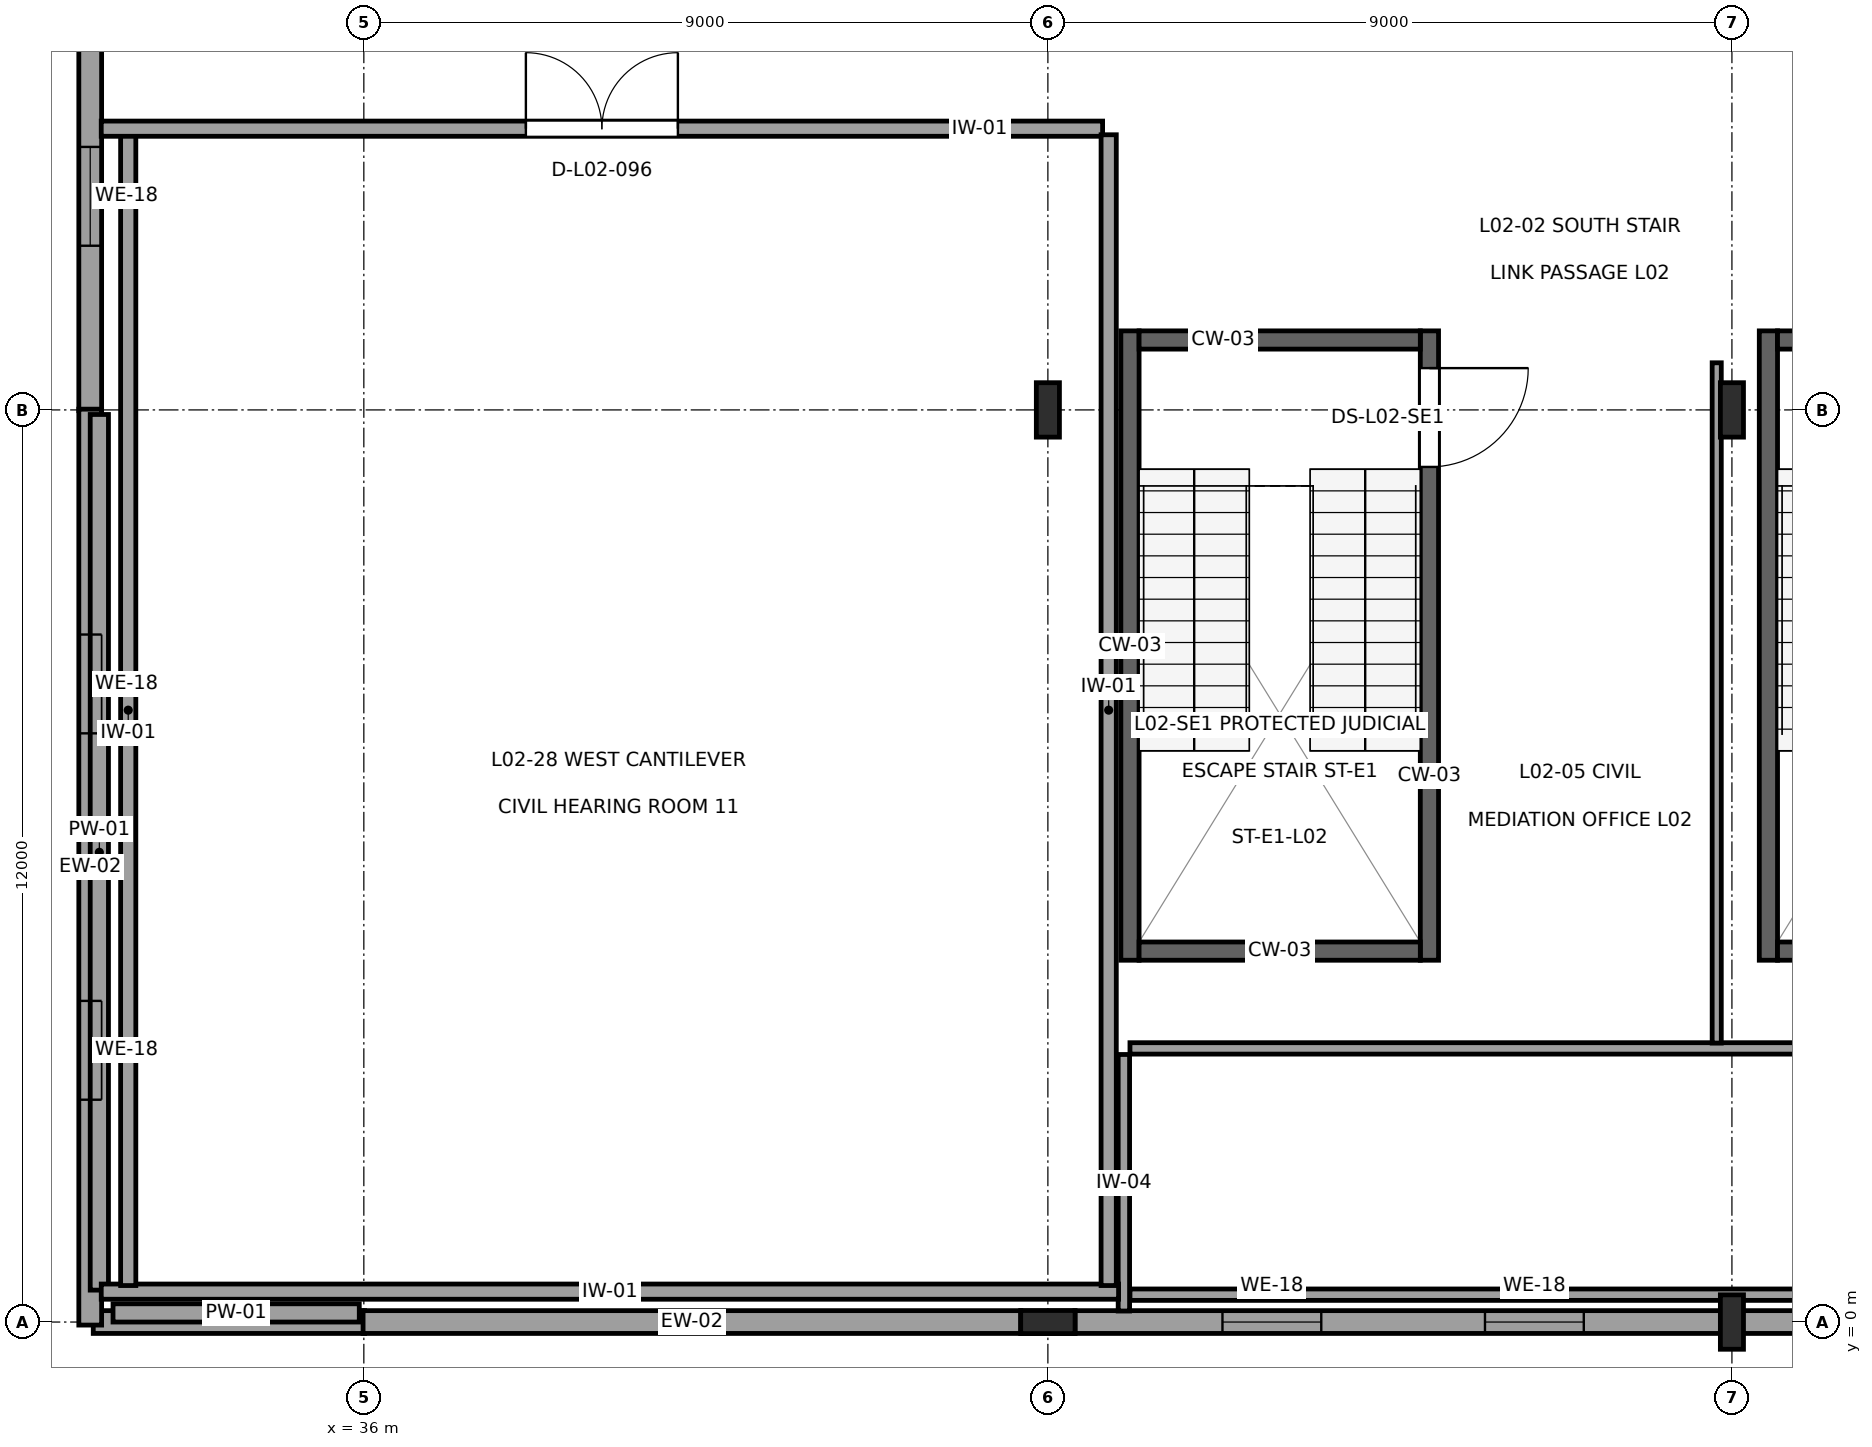
"""IFC4 building model, lengths in metres.
Left out: names, types, materials, properties, quantities, classifications, styles, units other than length and angle.
Written with IfcOpenShell. Run it as: python <this file> out.ifc"""

import sys

from ifc_helpers import new_model, si_unit, direction, frame, frame_2d, origin, origin_2d, place, context, subcontext, project, spatial, rectangle, i_section, extrude, element, fill, save


model = new_model("IFC4")
c1 = context("Model", 3, precision=1e-05, world=origin(), true_north=direction((0.0, 1.0)))
c2 = subcontext(c1, "Body", "Model", "MODEL_VIEW")
j1 = project(units=[si_unit("LENGTHUNIT", "METRE"), si_unit("PLANEANGLEUNIT", "RADIAN")], contexts=[c1])
p1 = place(None, origin())
s1 = spatial("IfcSite", under=j1, at=p1, CompositionType="ELEMENT")
p2 = place(p1, origin())
s2 = spatial("IfcBuilding", under=s1, at=p2, CompositionType="ELEMENT")
p3 = place(p2, frame((0.0, 0.0, 9.9)))
s3 = spatial("IfcBuildingStorey", under=s2, at=p3, CompositionType="ELEMENT", Elevation=9.9)
for number, where, z_axis, x_axis in (
    (1, (45.0, 0.0, 0.0), (0.0, 0.0, 1.0), (0.0, 1.0, 0.0)),
    (2, (45.0, 12.0, 0.0), (0.0, 0.0, 1.0), (1.0, 0.0, 0.0)),
    (3, (54.0, 0.0, 0.0), (0.0, 0.0, 1.0), (1.0, 0.0, 0.0)),
    (4, (54.0, 12.0, 0.0), (0.0, 0.0, 1.0), (1.0, 0.0, 0.0)),
):
    element("IfcColumn", number, at=place(p3, frame(where, z_axis=z_axis, x_axis=x_axis)), inside=s3, PredefinedType="COLUMN", context=c2, shape_type="SweptSolid", body=[
        extrude(i_section(OverallWidth=0.304, OverallDepth=0.716, WebThickness=0.021, FlangeThickness=0.04, at=origin_2d()), origin(), (0.0, 0.0, 1.0), 4.5),
    ])
p4 = place(p3, frame((32.44, 0.0, 0.0), z_axis=(0.0, 0.0, 1.0), x_axis=(1.0, 0.0, 0.0)))
e5 = element("IfcWall", 5, at=p4, inside=s3, PredefinedType="SOLIDWALL", context=c2, shape_type="SweptSolid", body=[
    extrude(rectangle(XDim=3.57, YDim=0.3, at=frame_2d((1.785, 0.0))), origin(), (0.0, 0.0, 1.0), 3.147),
])
p5 = place(p3, frame((35.99, 0.0, 0.0), z_axis=(0.0, 0.0, 1.0), x_axis=(1.0, 0.0, 0.0)))
e6 = element("IfcWall", 6, at=p5, inside=s3, PredefinedType="SOLIDWALL", context=c2, shape_type="SweptSolid", body=[
    extrude(rectangle(XDim=8.654, YDim=0.3, at=frame_2d((4.327, 0.0))), origin(), (0.0, 0.0, 1.0), 3.147),
])
p6 = place(p3, frame((45.356, 0.0, 0.0), z_axis=(0.0, 0.0, 1.0), x_axis=(1.0, 0.0, 0.0)))
e7 = element("IfcWall", 7, at=p6, inside=s3, PredefinedType="SOLIDWALL", context=c2, shape_type="SweptSolid", body=[
    extrude(rectangle(XDim=8.636, YDim=0.3, at=frame_2d((4.318, 0.0))), origin(), (0.0, 0.0, 1.0), 3.147),
])
p7 = place(p6, frame((1.941, 0.0, 0.9)))
e8 = element("IfcOpeningElement", 8, at=p7, cuts=e7, PredefinedType="OPENING", context=c2, shape_type="SweptSolid", body=[
    extrude(rectangle(XDim=1.3, YDim=1.3, at=frame_2d((0.65, 0.65))), frame((0.0, 0.165, 0.0), z_axis=(0.0, -1.0, 0.0), x_axis=(1.0, 0.0, 0.0)), (0.0, 0.0, 1.0), 0.33),
])
p8 = place(p6, frame((5.395, 0.0, 0.9)))
e9 = element("IfcOpeningElement", 9, at=p8, cuts=e7, PredefinedType="OPENING", context=c2, shape_type="SweptSolid", body=[
    extrude(rectangle(XDim=1.3, YDim=1.3, at=frame_2d((0.65, 0.65))), frame((0.0, 0.165, 0.0), z_axis=(0.0, -1.0, 0.0), x_axis=(1.0, 0.0, 0.0)), (0.0, 0.0, 1.0), 0.33),
])
p9 = place(p3, frame((54.008, 0.0, 0.0), z_axis=(0.0, 0.0, 1.0), x_axis=(1.0, 0.0, 0.0)))
e10 = element("IfcWall", 10, at=p9, inside=s3, PredefinedType="SOLIDWALL", context=c2, shape_type="SweptSolid", body=[
    extrude(rectangle(XDim=8.984, YDim=0.3, at=frame_2d((4.492, 0.0))), origin(), (0.0, 0.0, 1.0), 3.147),
])
p10 = place(p9, frame((2.045, 0.0, 0.9)))
e11 = element("IfcOpeningElement", 11, at=p10, cuts=e10, PredefinedType="OPENING", context=c2, shape_type="SweptSolid", body=[
    extrude(rectangle(XDim=1.3, YDim=1.3, at=frame_2d((0.65, 0.65))), frame((0.0, 0.165, 0.0), z_axis=(0.0, -1.0, 0.0), x_axis=(1.0, 0.0, 0.0)), (0.0, 0.0, 1.0), 0.33),
])
p11 = place(p9, frame((5.639, 0.0, 0.9)))
e12 = element("IfcOpeningElement", 12, at=p11, cuts=e10, PredefinedType="OPENING", context=c2, shape_type="SweptSolid", body=[
    extrude(rectangle(XDim=1.3, YDim=1.3, at=frame_2d((0.65, 0.65))), frame((0.0, 0.165, 0.0), z_axis=(0.0, -1.0, 0.0), x_axis=(1.0, 0.0, 0.0)), (0.0, 0.0, 1.0), 0.33),
])
p12 = place(p3, frame((32.4, 23.96, 0.0), z_axis=(0.0, 0.0, 1.0), x_axis=(0.0, -1.0, 0.0)))
e13 = element("IfcWall", 13, at=p12, inside=s3, PredefinedType="SOLIDWALL", context=c2, shape_type="SweptSolid", body=[
    extrude(rectangle(XDim=11.97, YDim=0.3, at=frame_2d((5.985, 0.0))), origin(), (0.0, 0.0, 1.0), 3.455),
])
p13 = place(p12, frame((2.941, 0.0, 0.9)))
e14 = element("IfcOpeningElement", 14, at=p13, cuts=e13, PredefinedType="OPENING", context=c2, shape_type="SweptSolid", body=[
    extrude(rectangle(XDim=1.3, YDim=1.3, at=frame_2d((0.65, 0.65))), frame((0.0, 0.165, 0.0), z_axis=(0.0, -1.0, 0.0), x_axis=(1.0, 0.0, 0.0)), (0.0, 0.0, 1.0), 0.33),
])
p14 = place(p12, frame((8.5, 0.0, 0.9)))
e15 = element("IfcOpeningElement", 15, at=p14, cuts=e13, PredefinedType="OPENING", context=c2, shape_type="SweptSolid", body=[
    extrude(rectangle(XDim=1.3, YDim=1.3, at=frame_2d((0.65, 0.65))), frame((0.0, 0.165, 0.0), z_axis=(0.0, -1.0, 0.0), x_axis=(1.0, 0.0, 0.0)), (0.0, 0.0, 1.0), 0.33),
])
p15 = place(p3, frame((32.4, 12.01, 0.0), z_axis=(0.0, 0.0, 1.0), x_axis=(0.0, -1.0, 0.0)))
e16 = element("IfcWall", 16, at=p15, inside=s3, PredefinedType="SOLIDWALL", context=c2, shape_type="SweptSolid", body=[
    extrude(rectangle(XDim=12.05, YDim=0.3, at=frame_2d((6.025, 0.0))), origin(), (0.0, 0.0, 1.0), 3.455),
])
p16 = place(p15, frame((2.965, 0.0, 0.9)))
e17 = element("IfcOpeningElement", 17, at=p16, cuts=e16, PredefinedType="OPENING", context=c2, shape_type="SweptSolid", body=[
    extrude(rectangle(XDim=1.3, YDim=1.3, at=frame_2d((0.65, 0.65))), frame((0.0, 0.165, 0.0), z_axis=(0.0, -1.0, 0.0), x_axis=(1.0, 0.0, 0.0)), (0.0, 0.0, 1.0), 0.33),
])
p17 = place(p15, frame((7.785, 0.0, 0.9)))
e18 = element("IfcOpeningElement", 18, at=p17, cuts=e16, PredefinedType="OPENING", context=c2, shape_type="SweptSolid", body=[
    extrude(rectangle(XDim=1.3, YDim=1.3, at=frame_2d((0.65, 0.65))), frame((0.0, 0.165, 0.0), z_axis=(0.0, -1.0, 0.0), x_axis=(1.0, 0.0, 0.0)), (0.0, 0.0, 1.0), 0.33),
])
p18 = place(p3, frame((32.7, 0.12, 4.28), z_axis=(0.0, 0.0, 1.0), x_axis=(1.0, 0.0, 0.0)))
e19 = element("IfcWall", 19, at=p18, inside=s3, PredefinedType="PARAPET", context=c2, shape_type="SweptSolid", body=[
    extrude(rectangle(XDim=3.24, YDim=0.24, at=frame_2d((1.62, 0.0))), origin(), (0.0, 0.0, 1.0), 0.77),
])
p19 = place(p3, frame((32.52, 0.42, 4.28), z_axis=(0.0, 0.0, 1.0), x_axis=(0.0, 1.0, 0.0)))
e20 = element("IfcWall", 20, at=p19, inside=s3, PredefinedType="PARAPET", context=c2, shape_type="SweptSolid", body=[
    extrude(rectangle(XDim=11.52, YDim=0.24, at=frame_2d((5.76, 0.0))), origin(), (0.0, 0.0, 1.0), 0.77),
])
p20 = place(p3, frame((54.48, 4.76, 0.0), z_axis=(0.0, 0.0, 1.0), x_axis=(0.0, 1.0, 0.0)))
e21 = element("IfcWall", 21, at=p20, inside=s3, PredefinedType="SHEAR", context=c2, shape_type="SweptSolid", body=[
    extrude(rectangle(XDim=8.28, YDim=0.24, at=frame_2d((4.14, 0.0))), origin(), (0.0, 0.0, 1.0), 4.31),
])
for number, where, z_axis, x_axis in (
    (22, (54.6, 4.88, 0.0), (0.0, 0.0, 1.0), (1.0, 0.0, 0.0)),
    (23, (54.6, 12.92, 0.0), (0.0, 0.0, 1.0), (1.0, 0.0, 0.0)),
):
    element("IfcWall", number, at=place(p3, frame(where, z_axis=z_axis, x_axis=x_axis)), inside=s3, PredefinedType="SHEAR", context=c2, shape_type="SweptSolid", body=[
        extrude(rectangle(XDim=3.7, YDim=0.24, at=frame_2d((1.85, 0.0))), origin(), (0.0, 0.0, 1.0), 4.31),
    ])
p21 = place(p3, frame((46.08, 4.76, 0.0), z_axis=(0.0, 0.0, 1.0), x_axis=(0.0, 1.0, 0.0)))
e24 = element("IfcWall", 24, at=p21, inside=s3, PredefinedType="SHEAR", context=c2, shape_type="SweptSolid", body=[
    extrude(rectangle(XDim=8.28, YDim=0.24, at=frame_2d((4.14, 0.0))), origin(), (0.0, 0.0, 1.0), 4.31),
])
p22 = place(p3, frame((50.02, 4.76, 0.0), z_axis=(0.0, 0.0, 1.0), x_axis=(0.0, 1.0, 0.0)))
e25 = element("IfcWall", 25, at=p22, inside=s3, PredefinedType="SHEAR", context=c2, shape_type="SweptSolid", body=[
    extrude(rectangle(XDim=8.28, YDim=0.24, at=frame_2d((4.14, 0.0))), origin(), (0.0, 0.0, 1.0), 4.31),
])
p23 = place(p22, frame((6.49, 0.0, 0.0)))
e26 = element("IfcOpeningElement", 26, at=p23, cuts=e25, PredefinedType="OPENING", context=c2, shape_type="SweptSolid", body=[
    extrude(rectangle(XDim=1.3, YDim=2.2, at=frame_2d((0.65, 1.1))), frame((0.0, 0.135, 0.0), z_axis=(0.0, -1.0, 0.0), x_axis=(1.0, 0.0, 0.0)), (0.0, 0.0, 1.0), 0.27),
])
for number, where, z_axis, x_axis in (
    (27, (46.2, 4.88, 0.0), (0.0, 0.0, 1.0), (1.0, 0.0, 0.0)),
    (28, (46.2, 12.92, 0.0), (0.0, 0.0, 1.0), (1.0, 0.0, 0.0)),
):
    element("IfcWall", number, at=place(p3, frame(where, z_axis=z_axis, x_axis=x_axis)), inside=s3, PredefinedType="SHEAR", context=c2, shape_type="SweptSolid", body=[
        extrude(rectangle(XDim=3.7, YDim=0.24, at=frame_2d((1.85, 0.0))), origin(), (0.0, 0.0, 1.0), 4.31),
    ])
p24 = place(p3, frame((71.92, 0.36, 0.0), z_axis=(0.0, 0.0, 1.0), x_axis=(-1.0, 0.0, 0.0)))
e29 = element("IfcWall", 29, at=p24, inside=s3, PredefinedType="PARTITIONING", context=c2, shape_type="SweptSolid", body=[
    extrude(rectangle(XDim=25.84, YDim=0.15, at=frame_2d((12.92, 0.0))), origin(), (0.0, 0.0, 1.0), 4.14),
])
p25 = place(p3, frame((46.0, 0.145, 0.0), z_axis=(0.0, 0.0, 1.0), x_axis=(0.0, 1.0, 0.0)))
e30 = element("IfcWall", 30, at=p25, inside=s3, PredefinedType="PARTITIONING", context=c2, shape_type="SweptSolid", body=[
    extrude(rectangle(XDim=3.375, YDim=0.15, at=frame_2d((1.688, 0.0))), origin(), (0.0, 0.0, 1.0), 4.14),
])
p26 = place(p3, frame((46.08, 3.6, 0.0), z_axis=(0.0, 0.0, 1.0), x_axis=(1.0, 0.0, 0.0)))
e31 = element("IfcWall", 31, at=p26, inside=s3, PredefinedType="PARTITIONING", context=c2, shape_type="SweptSolid", body=[
    extrude(rectangle(XDim=71.04, YDim=0.15, at=frame_2d((35.52, 0.0))), origin(), (0.0, 0.0, 1.0), 4.14),
])
p27 = place(p26, frame((27.595, 0.0, 0.0)))
e32 = element("IfcOpeningElement", 32, at=p27, cuts=e31, PredefinedType="OPENING", context=c2, shape_type="SweptSolid", body=[
    extrude(rectangle(XDim=1.05, YDim=2.25, at=frame_2d((0.525, 1.125))), frame((0.0, 0.09, 0.0), z_axis=(0.0, -1.0, 0.0), x_axis=(1.0, 0.0, 0.0)), (0.0, 0.0, 1.0), 0.18),
])
p28 = place(p3, frame((53.8, 12.62, 0.0), z_axis=(0.0, 0.0, 1.0), x_axis=(0.0, -1.0, 0.0)))
e33 = element("IfcWall", 33, at=p28, inside=s3, PredefinedType="PARTITIONING", context=c2, shape_type="SweptSolid", body=[
    extrude(rectangle(XDim=8.95, YDim=0.12, at=frame_2d((4.475, 0.0))), origin(), (0.0, 0.0, 1.0), 3.685),
])
p29 = place(p3, frame((45.93, 0.4, 0.0), z_axis=(0.0, 0.0, 1.0), x_axis=(-1.0, 0.0, 0.0)))
e34 = element("IfcWall", 34, at=p29, inside=s3, PredefinedType="PARTITIONING", context=c2, shape_type="SweptSolid", body=[
    extrude(rectangle(XDim=13.385, YDim=0.2, at=frame_2d((6.692, 0.0))), origin(), (0.0, 0.0, 1.0), 4.14),
])
p30 = place(p3, frame((32.9, 0.48, 0.0), z_axis=(0.0, 0.0, 1.0), x_axis=(0.0, 1.0, 0.0)))
e35 = element("IfcWall", 35, at=p30, inside=s3, PredefinedType="PARTITIONING", context=c2, shape_type="SweptSolid", body=[
    extrude(rectangle(XDim=15.14, YDim=0.2, at=frame_2d((7.57, 0.0))), origin(), (0.0, 0.0, 1.0), 4.14),
])
p31 = place(p3, frame((32.545, 15.7, 0.0), z_axis=(0.0, 0.0, 1.0), x_axis=(1.0, 0.0, 0.0)))
e36 = element("IfcWall", 36, at=p31, inside=s3, PredefinedType="PARTITIONING", context=c2, shape_type="SweptSolid", body=[
    extrude(rectangle(XDim=13.175, YDim=0.2, at=frame_2d((6.587, 0.0))), origin(), (0.0, 0.0, 1.0), 4.14),
])
p32 = place(p31, frame((5.587, 0.0, 0.0)))
e37 = element("IfcOpeningElement", 37, at=p32, cuts=e36, PredefinedType="OPENING", context=c2, shape_type="SweptSolid", body=[
    extrude(rectangle(XDim=2.0, YDim=2.6, at=frame_2d((1.0, 1.3))), frame((0.0, 0.115, 0.0), z_axis=(0.0, -1.0, 0.0), x_axis=(1.0, 0.0, 0.0)), (0.0, 0.0, 1.0), 0.23),
])
p33 = place(p3, frame((45.8, 15.62, 0.0), z_axis=(0.0, 0.0, 1.0), x_axis=(0.0, -1.0, 0.0)))
e38 = element("IfcWall", 38, at=p33, inside=s3, PredefinedType="PARTITIONING", context=c2, shape_type="SweptSolid", body=[
    extrude(rectangle(XDim=15.14, YDim=0.2, at=frame_2d((7.57, 0.0))), origin(), (0.0, 0.0, 1.0), 4.14),
])
p34 = place(p7, origin())
e39 = element("IfcWindow", 39, at=p34, inside=s3, PartitioningType="SINGLE_PANEL", PredefinedType="WINDOW", context=c2, shape_type="SweptSolid", body=[
    extrude(rectangle(XDim=1.3, YDim=1.3, at=frame_2d((0.65, 0.65))), frame((0.0, 0.03, 0.0), z_axis=(0.0, -1.0, 0.0), x_axis=(1.0, 0.0, 0.0)), (0.0, 0.0, 1.0), 0.06),
])
fill(e8, e39)
p35 = place(p8, origin())
e40 = element("IfcWindow", 40, at=p35, inside=s3, PartitioningType="SINGLE_PANEL", PredefinedType="WINDOW", context=c2, shape_type="SweptSolid", body=[
    extrude(rectangle(XDim=1.3, YDim=1.3, at=frame_2d((0.65, 0.65))), frame((0.0, 0.03, 0.0), z_axis=(0.0, -1.0, 0.0), x_axis=(1.0, 0.0, 0.0)), (0.0, 0.0, 1.0), 0.06),
])
fill(e9, e40)
p36 = place(p14, origin())
e41 = element("IfcWindow", 41, at=p36, inside=s3, PartitioningType="SINGLE_PANEL", PredefinedType="WINDOW", context=c2, shape_type="SweptSolid", body=[
    extrude(rectangle(XDim=1.3, YDim=1.3, at=frame_2d((0.65, 0.65))), frame((0.0, 0.03, 0.0), z_axis=(0.0, -1.0, 0.0), x_axis=(1.0, 0.0, 0.0)), (0.0, 0.0, 1.0), 0.06),
])
fill(e15, e41)
p37 = place(p16, origin())
e42 = element("IfcWindow", 42, at=p37, inside=s3, PartitioningType="SINGLE_PANEL", PredefinedType="WINDOW", context=c2, shape_type="SweptSolid", body=[
    extrude(rectangle(XDim=1.3, YDim=1.3, at=frame_2d((0.65, 0.65))), frame((0.0, 0.03, 0.0), z_axis=(0.0, -1.0, 0.0), x_axis=(1.0, 0.0, 0.0)), (0.0, 0.0, 1.0), 0.06),
])
fill(e17, e42)
p38 = place(p17, origin())
e43 = element("IfcWindow", 43, at=p38, inside=s3, PartitioningType="SINGLE_PANEL", PredefinedType="WINDOW", context=c2, shape_type="SweptSolid", body=[
    extrude(rectangle(XDim=1.3, YDim=1.3, at=frame_2d((0.65, 0.65))), frame((0.0, 0.03, 0.0), z_axis=(0.0, -1.0, 0.0), x_axis=(1.0, 0.0, 0.0)), (0.0, 0.0, 1.0), 0.06),
])
fill(e18, e43)
p39 = place(p23, frame((1.3, 0.0, 0.0), z_axis=(0.0, 0.0, 1.0), x_axis=(-1.0, 0.0, 0.0)))
e44 = element("IfcDoor", 44, at=p39, inside=s3, OperationType="SINGLE_SWING_RIGHT", PredefinedType="DOOR", context=c2, shape_type="SweptSolid", body=[
    extrude(rectangle(XDim=1.3, YDim=2.2, at=frame_2d((0.65, 1.1))), frame((0.0, 0.025, 0.0), z_axis=(0.0, -1.0, 0.0), x_axis=(1.0, 0.0, 0.0)), (0.0, 0.0, 1.0), 0.05),
])
fill(e26, e44)
p40 = place(p32, origin())
e45 = element("IfcDoor", 45, at=p40, inside=s3, OperationType="DOUBLE_DOOR_SINGLE_SWING", PredefinedType="DOOR", context=c2, shape_type="SweptSolid", body=[
    extrude(rectangle(XDim=2.0, YDim=2.6, at=frame_2d((1.0, 1.3))), frame((0.0, 0.025, 0.0), z_axis=(0.0, -1.0, 0.0), x_axis=(1.0, 0.0, 0.0)), (0.0, 0.0, 1.0), 0.05),
])
fill(e37, e45)
save(model, sys.argv[1])
